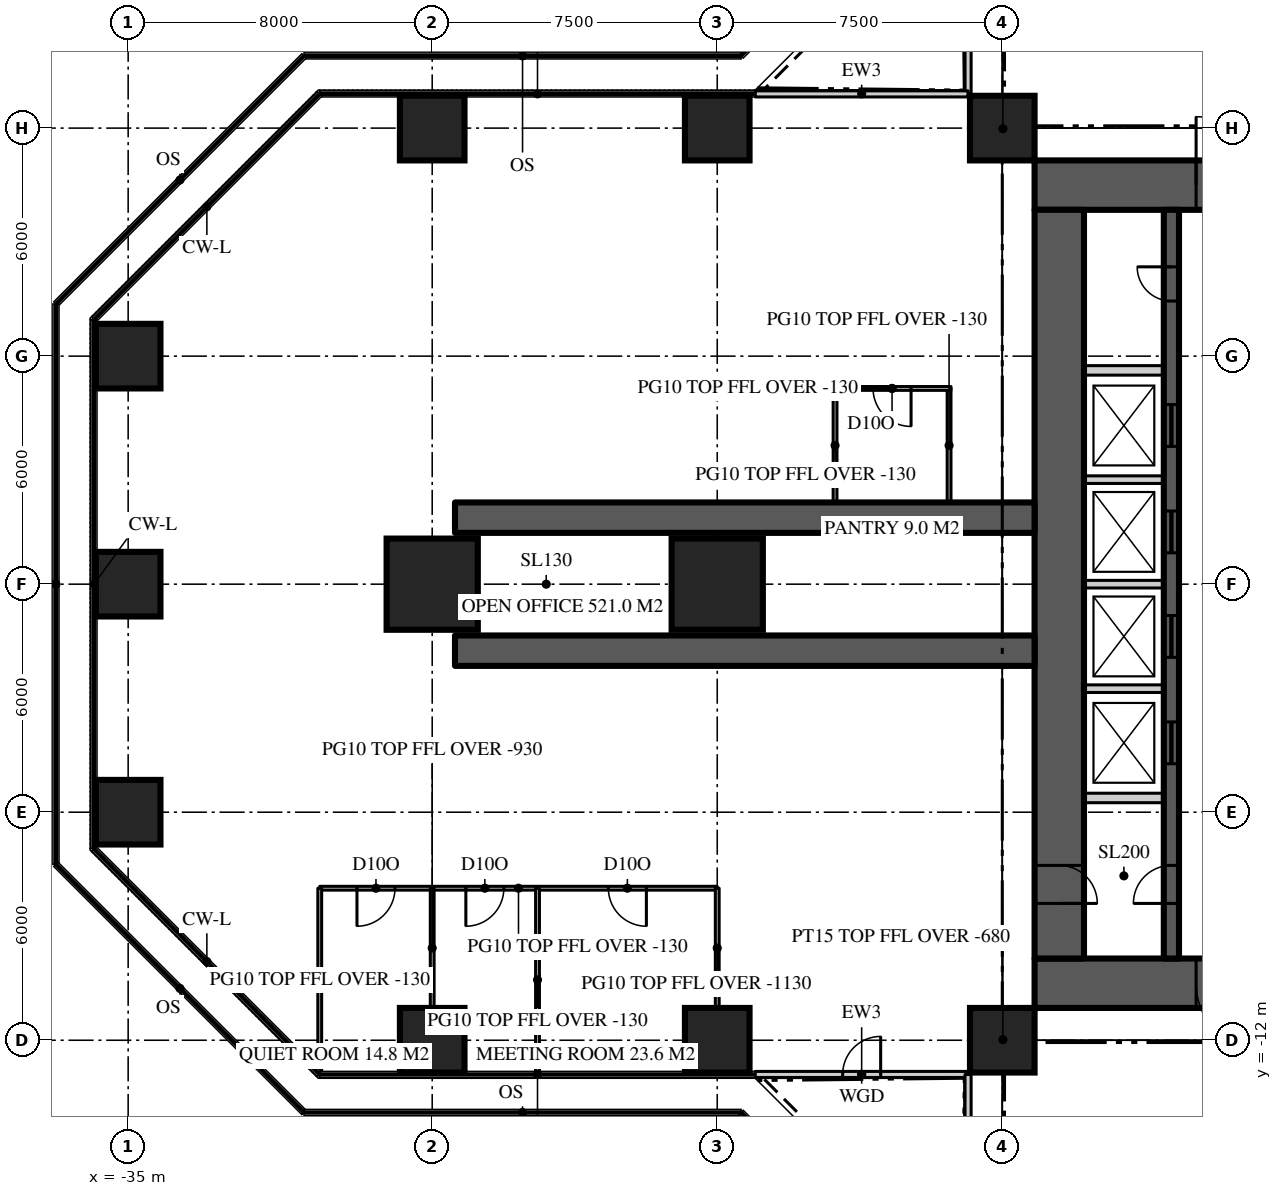
"""IFC4 building model, lengths in metres.
Left out: names, types, materials, properties, quantities, classifications, styles, units other than length and angle.
Written with IfcOpenShell. Run it as: python <this file> out.ifc"""

import sys

from ifc_helpers import new_model, si_unit, direction, frame, frame_2d, origin, origin_2d, place, context, subcontext, project, spatial, rectangle, extrude, element, fill, save


model = new_model("IFC4")
c1 = context("Model", 3, precision=1e-05, world=origin(), true_north=direction((0.0, 1.0)))
c2 = subcontext(c1, "Body", "Model", "MODEL_VIEW")
j1 = project(units=[si_unit("LENGTHUNIT", "METRE"), si_unit("PLANEANGLEUNIT", "RADIAN")], contexts=[c1])
p1 = place(None, origin())
s1 = spatial("IfcSite", under=j1, at=p1, CompositionType="ELEMENT")
p2 = place(p1, origin())
s2 = spatial("IfcBuilding", under=s1, at=p2, CompositionType="ELEMENT")
p3 = place(p2, frame((0.0, 0.0, 70.8)))
s3 = spatial("IfcBuildingStorey", under=s2, at=p3, CompositionType="ELEMENT", Elevation=70.8)
p4 = place(p3, frame((-11.15, 10.5, 0.0), z_axis=(0.0, 0.0, 1.0), x_axis=(1.0, 0.0, 0.0)))
e1 = element("IfcWall", 1, at=p4, inside=s3, PredefinedType="SHEAR", context=c2, shape_type="SweptSolid", body=[
    extrude(rectangle(XDim=22.3, YDim=1.3, at=frame_2d((11.15, 0.0))), origin(), (0.0, 0.0, 1.0), 3.9),
])
p5 = place(p4, frame((4.25, 0.0, 0.0)))
e2 = element("IfcOpeningElement", 2, at=p5, cuts=e1, PredefinedType="OPENING", context=c2, shape_type="SweptSolid", body=[
    extrude(rectangle(XDim=1.8, YDim=2.2, at=frame_2d((0.9, 1.1))), frame((0.0, 0.66, 0.0), z_axis=(0.0, -1.0, 0.0), x_axis=(1.0, 0.0, 0.0)), (0.0, 0.0, 1.0), 1.32),
])
p6 = place(p4, frame((16.25, 0.0, 0.0)))
e3 = element("IfcOpeningElement", 3, at=p6, cuts=e1, PredefinedType="OPENING", context=c2, shape_type="SweptSolid", body=[
    extrude(rectangle(XDim=1.8, YDim=2.2, at=frame_2d((0.9, 1.1))), frame((0.0, 0.66, 0.0), z_axis=(0.0, -1.0, 0.0), x_axis=(1.0, 0.0, 0.0)), (0.0, 0.0, 1.0), 1.32),
])
p7 = place(p3, frame((11.15, -10.5, 0.0), z_axis=(0.0, 0.0, 1.0), x_axis=(-1.0, 0.0, 0.0)))
e4 = element("IfcWall", 4, at=p7, inside=s3, PredefinedType="SHEAR", context=c2, shape_type="SweptSolid", body=[
    extrude(rectangle(XDim=22.3, YDim=1.3, at=frame_2d((11.15, 0.0))), origin(), (0.0, 0.0, 1.0), 3.9),
])
p8 = place(p7, frame((16.25, 0.0, 0.0)))
e5 = element("IfcOpeningElement", 5, at=p8, cuts=e4, PredefinedType="OPENING", context=c2, shape_type="SweptSolid", body=[
    extrude(rectangle(XDim=1.8, YDim=2.2, at=frame_2d((0.9, 1.1))), frame((0.0, 0.66, 0.0), z_axis=(0.0, -1.0, 0.0), x_axis=(1.0, 0.0, 0.0)), (0.0, 0.0, 1.0), 1.32),
])
p9 = place(p7, frame((4.25, 0.0, 0.0)))
e6 = element("IfcOpeningElement", 6, at=p9, cuts=e4, PredefinedType="OPENING", context=c2, shape_type="SweptSolid", body=[
    extrude(rectangle(XDim=1.8, YDim=2.2, at=frame_2d((0.9, 1.1))), frame((0.0, 0.66, 0.0), z_axis=(0.0, -1.0, 0.0), x_axis=(1.0, 0.0, 0.0)), (0.0, 0.0, 1.0), 1.32),
])
p10 = place(p3, frame((-10.5, 9.85, 0.0), z_axis=(0.0, 0.0, 1.0), x_axis=(0.0, -1.0, 0.0)))
e7 = element("IfcWall", 7, at=p10, inside=s3, PredefinedType="SHEAR", context=c2, shape_type="SweptSolid", body=[
    extrude(rectangle(XDim=19.7, YDim=1.3, at=frame_2d((9.85, 0.0))), origin(), (0.0, 0.0, 1.0), 3.9),
])
p11 = place(p10, frame((17.25, 0.0, 0.0)))
e8 = element("IfcOpeningElement", 8, at=p11, cuts=e7, PredefinedType="OPENING", context=c2, shape_type="SweptSolid", body=[
    extrude(rectangle(XDim=1.0, YDim=2.2, at=frame_2d((0.5, 1.1))), frame((0.0, 0.66, 0.0), z_axis=(0.0, -1.0, 0.0), x_axis=(1.0, 0.0, 0.0)), (0.0, 0.0, 1.0), 1.32),
])
for number, where, z_axis, x_axis in (
    (9, (-11.15, 1.75, 0.0), (0.0, 0.0, 1.0), (-1.0, 0.0, 0.0)),
    (10, (-11.15, -1.75, 0.0), (0.0, 0.0, 1.0), (-1.0, 0.0, 0.0)),
):
    element("IfcWall", number, at=place(p3, frame(where, z_axis=z_axis, x_axis=x_axis)), inside=s3, PredefinedType="SHEAR", context=c2, shape_type="SweptSolid", body=[
        extrude(rectangle(XDim=15.25, YDim=0.8, at=frame_2d((7.625, 0.0))), origin(), (0.0, 0.0, 1.0), 3.9),
    ])
for number, where, z_axis, x_axis in (
    (11, (-27.0, -12.0, 0.0), (0.0, 0.0, 1.0), (1.0, 0.0, 0.0)),
    (12, (-19.5, -12.0, 0.0), (0.0, 0.0, 1.0), (1.0, 0.0, 0.0)),
    (13, (-12.0, -12.0, 0.0), (0.0, 0.0, 1.0), (1.0, 0.0, 0.0)),
    (14, (-35.0, -6.0, 0.0), (0.0, 0.0, 1.0), (1.0, 0.0, 0.0)),
    (15, (-35.0, 0.0, 0.0), (0.0, 0.0, 1.0), (1.0, 0.0, 0.0)),
):
    element("IfcColumn", number, at=place(p3, frame(where, z_axis=z_axis, x_axis=x_axis)), inside=s3, PredefinedType="COLUMN", context=c2, shape_type="SweptSolid", body=[
        extrude(rectangle(XDim=1.7, YDim=1.7, at=origin_2d()), origin(), (0.0, 0.0, 1.0), 3.9),
    ])
for number, where, z_axis, x_axis in (
    (16, (-27.0, 0.0, 0.0), (0.0, 0.0, 1.0), (1.0, 0.0, 0.0)),
    (17, (-19.5, 0.0, 0.0), (0.0, 0.0, 1.0), (1.0, 0.0, 0.0)),
):
    element("IfcColumn", number, at=place(p3, frame(where, z_axis=z_axis, x_axis=x_axis)), inside=s3, PredefinedType="COLUMN", context=c2, shape_type="SweptSolid", body=[
        extrude(rectangle(XDim=2.4, YDim=2.4, at=origin_2d()), origin(), (0.0, 0.0, 1.0), 3.9),
    ])
for number, where, z_axis, x_axis in (
    (18, (-35.0, 6.0, 0.0), (0.0, 0.0, 1.0), (1.0, 0.0, 0.0)),
    (19, (-27.0, 12.0, 0.0), (0.0, 0.0, 1.0), (1.0, 0.0, 0.0)),
    (20, (-19.5, 12.0, 0.0), (0.0, 0.0, 1.0), (1.0, 0.0, 0.0)),
    (21, (-12.0, 12.0, 0.0), (0.0, 0.0, 1.0), (1.0, 0.0, 0.0)),
):
    element("IfcColumn", number, at=place(p3, frame(where, z_axis=z_axis, x_axis=x_axis)), inside=s3, PredefinedType="COLUMN", context=c2, shape_type="SweptSolid", body=[
        extrude(rectangle(XDim=1.7, YDim=1.7, at=origin_2d()), origin(), (0.0, 0.0, 1.0), 3.9),
    ])
p12 = place(p3, frame((-12.9, 18.5, 0.0), z_axis=(0.0, 0.0, 1.0), x_axis=(0.0, -1.0, 0.0)))
e22 = element("IfcWall", 22, at=p12, inside=s3, PredefinedType="SOLIDWALL", context=c2, shape_type="SweptSolid", body=[
    extrude(rectangle(XDim=5.6, YDim=0.16, at=frame_2d((2.8, 0.0))), origin(), (0.0, 0.0, 1.0), 3.77),
])
p13 = place(p12, frame((2.3, 0.0, 0.0)))
e23 = element("IfcOpeningElement", 23, at=p13, cuts=e22, PredefinedType="OPENING", context=c2, shape_type="SweptSolid", body=[
    extrude(rectangle(XDim=1.0, YDim=2.2, at=frame_2d((0.5, 1.1))), frame((0.0, 0.09, 0.0), z_axis=(0.0, -1.0, 0.0), x_axis=(1.0, 0.0, 0.0)), (0.0, 0.0, 1.0), 0.18),
])
p14 = place(p3, frame((-12.9, 12.9, 0.0), z_axis=(0.0, 0.0, 1.0), x_axis=(-1.0, 0.0, 0.0)))
e24 = element("IfcWall", 24, at=p14, inside=s3, PredefinedType="SOLIDWALL", context=c2, shape_type="SweptSolid", body=[
    extrude(rectangle(XDim=5.6, YDim=0.16, at=frame_2d((2.8, 0.0))), origin(), (0.0, 0.0, 1.0), 3.77),
])
p15 = place(p3, frame((-18.5, -12.9, 0.0), z_axis=(0.0, 0.0, 1.0), x_axis=(1.0, 0.0, 0.0)))
e25 = element("IfcWall", 25, at=p15, inside=s3, PredefinedType="SOLIDWALL", context=c2, shape_type="SweptSolid", body=[
    extrude(rectangle(XDim=5.6, YDim=0.16, at=frame_2d((2.8, 0.0))), origin(), (0.0, 0.0, 1.0), 3.77),
])
p16 = place(p15, frame((2.3, 0.0, 0.0)))
e26 = element("IfcOpeningElement", 26, at=p16, cuts=e25, PredefinedType="OPENING", context=c2, shape_type="SweptSolid", body=[
    extrude(rectangle(XDim=1.0, YDim=2.2, at=frame_2d((0.5, 1.1))), frame((0.0, 0.09, 0.0), z_axis=(0.0, -1.0, 0.0), x_axis=(1.0, 0.0, 0.0)), (0.0, 0.0, 1.0), 0.18),
])
p17 = place(p3, frame((-12.9, -12.9, 0.0), z_axis=(0.0, 0.0, 1.0), x_axis=(0.0, -1.0, 0.0)))
e27 = element("IfcWall", 27, at=p17, inside=s3, PredefinedType="SOLIDWALL", context=c2, shape_type="SweptSolid", body=[
    extrude(rectangle(XDim=5.6, YDim=0.16, at=frame_2d((2.8, 0.0))), origin(), (0.0, 0.0, 1.0), 3.77),
])
p18 = place(p3, frame((-7.55, -9.85, 0.0), z_axis=(0.0, 0.0, 1.0), x_axis=(0.0, 1.0, 0.0)))
e28 = element("IfcWall", 28, at=p18, inside=s3, PredefinedType="SHEAR", context=c2, shape_type="SweptSolid", body=[
    extrude(rectangle(XDim=19.7, YDim=0.4, at=frame_2d((9.85, 0.0))), origin(), (0.0, 0.0, 1.0), 3.9),
])
p19 = place(p18, frame((1.45, 0.0, 0.0)))
e29 = element("IfcOpeningElement", 29, at=p19, cuts=e28, PredefinedType="OPENING", context=c2, shape_type="SweptSolid", body=[
    extrude(rectangle(XDim=1.0, YDim=2.2, at=frame_2d((0.5, 1.1))), frame((0.0, 0.21, 0.0), z_axis=(0.0, -1.0, 0.0), x_axis=(1.0, 0.0, 0.0)), (0.0, 0.0, 1.0), 0.42),
])
p20 = place(p18, frame((17.3, 0.0, 0.0)))
e30 = element("IfcOpeningElement", 30, at=p20, cuts=e28, PredefinedType="OPENING", context=c2, shape_type="SweptSolid", body=[
    extrude(rectangle(XDim=0.9, YDim=2.1, at=frame_2d((0.45, 1.05))), frame((0.0, 0.21, 0.0), z_axis=(0.0, -1.0, 0.0), x_axis=(1.0, 0.0, 0.0)), (0.0, 0.0, 1.0), 0.42),
])
p21 = place(p18, frame((5.125, 0.0, 0.0)))
e31 = element("IfcOpeningElement", 31, at=p21, cuts=e28, PredefinedType="OPENING", context=c2, shape_type="SweptSolid", body=[
    extrude(rectangle(XDim=1.1, YDim=2.2, at=frame_2d((0.55, 1.1))), frame((0.0, 0.21, 0.0), z_axis=(0.0, -1.0, 0.0), x_axis=(1.0, 0.0, 0.0)), (0.0, 0.0, 1.0), 0.42),
])
p22 = place(p18, frame((7.925, 0.0, 0.0)))
e32 = element("IfcOpeningElement", 32, at=p22, cuts=e28, PredefinedType="OPENING", context=c2, shape_type="SweptSolid", body=[
    extrude(rectangle(XDim=1.1, YDim=2.2, at=frame_2d((0.55, 1.1))), frame((0.0, 0.21, 0.0), z_axis=(0.0, -1.0, 0.0), x_axis=(1.0, 0.0, 0.0)), (0.0, 0.0, 1.0), 0.42),
])
p23 = place(p18, frame((10.675, 0.0, 0.0)))
e33 = element("IfcOpeningElement", 33, at=p23, cuts=e28, PredefinedType="OPENING", context=c2, shape_type="SweptSolid", body=[
    extrude(rectangle(XDim=1.1, YDim=2.2, at=frame_2d((0.55, 1.1))), frame((0.0, 0.21, 0.0), z_axis=(0.0, -1.0, 0.0), x_axis=(1.0, 0.0, 0.0)), (0.0, 0.0, 1.0), 0.42),
])
p24 = place(p18, frame((13.475, 0.0, 0.0)))
e34 = element("IfcOpeningElement", 34, at=p24, cuts=e28, PredefinedType="OPENING", context=c2, shape_type="SweptSolid", body=[
    extrude(rectangle(XDim=1.1, YDim=2.2, at=frame_2d((0.55, 1.1))), frame((0.0, 0.21, 0.0), z_axis=(0.0, -1.0, 0.0), x_axis=(1.0, 0.0, 0.0)), (0.0, 0.0, 1.0), 0.42),
])
for number, where, z_axis, x_axis in (
    (35, (-9.85, 5.625, 0.0), (0.0, 0.0, 1.0), (1.0, 0.0, 0.0)),
    (36, (-9.85, -5.625, 0.0), (0.0, 0.0, 1.0), (1.0, 0.0, 0.0)),
):
    element("IfcWall", number, at=place(p3, frame(where, z_axis=z_axis, x_axis=x_axis)), inside=s3, PredefinedType="SOLIDWALL", context=c2, shape_type="SweptSolid", body=[
        extrude(rectangle(XDim=2.1, YDim=0.25, at=frame_2d((1.05, 0.0))), origin(), (0.0, 0.0, 1.0), 3.7),
    ])
for number, where, z_axis, x_axis in (
    (37, (-9.85, -2.75, 0.0), (0.0, 0.0, 1.0), (1.0, 0.0, 0.0)),
    (38, (-9.85, 0.0, 0.0), (0.0, 0.0, 1.0), (1.0, 0.0, 0.0)),
    (39, (-9.85, 2.75, 0.0), (0.0, 0.0, 1.0), (1.0, 0.0, 0.0)),
):
    element("IfcWall", number, at=place(p3, frame(where, z_axis=z_axis, x_axis=x_axis)), inside=s3, PredefinedType="SOLIDWALL", context=c2, shape_type="SweptSolid", body=[
        extrude(rectangle(XDim=2.1, YDim=0.2, at=frame_2d((1.05, 0.0))), origin(), (0.0, 0.0, 1.0), 3.7),
    ])
p25 = place(p3, frame((-19.5, -8.0, 0.0), z_axis=(0.0, 0.0, 1.0), x_axis=(-1.0, 0.0, 0.0)))
e40 = element("IfcWall", 40, at=p25, inside=s3, PredefinedType="PARTITIONING", context=c2, shape_type="SweptSolid", body=[
    extrude(rectangle(XDim=10.459, YDim=0.1, at=frame_2d((5.229, 0.0))), origin(), (0.0, 0.0, 1.0), 3.77),
])
p26 = place(p25, frame((1.865, 0.0, 0.0)))
e41 = element("IfcOpeningElement", 41, at=p26, cuts=e40, PredefinedType="OPENING", context=c2, shape_type="SweptSolid", body=[
    extrude(rectangle(XDim=1.0, YDim=2.2, at=frame_2d((0.5, 1.1))), frame((0.0, 0.06, 0.0), z_axis=(0.0, -1.0, 0.0), x_axis=(1.0, 0.0, 0.0)), (0.0, 0.0, 1.0), 0.12),
])
p27 = place(p25, frame((5.615, 0.0, 0.0)))
e42 = element("IfcOpeningElement", 42, at=p27, cuts=e40, PredefinedType="OPENING", context=c2, shape_type="SweptSolid", body=[
    extrude(rectangle(XDim=1.0, YDim=2.2, at=frame_2d((0.5, 1.1))), frame((0.0, 0.06, 0.0), z_axis=(0.0, -1.0, 0.0), x_axis=(1.0, 0.0, 0.0)), (0.0, 0.0, 1.0), 0.12),
])
p28 = place(p25, frame((8.479, 0.0, 0.0)))
e43 = element("IfcOpeningElement", 43, at=p28, cuts=e40, PredefinedType="OPENING", context=c2, shape_type="SweptSolid", body=[
    extrude(rectangle(XDim=1.0, YDim=2.2, at=frame_2d((0.5, 1.1))), frame((0.0, 0.06, 0.0), z_axis=(0.0, -1.0, 0.0), x_axis=(1.0, 0.0, 0.0)), (0.0, 0.0, 1.0), 0.12),
])
p29 = place(p3, frame((-19.5, -8.0, 0.0), z_axis=(0.0, 0.0, 1.0), x_axis=(0.0, -1.0, 0.0)))
e44 = element("IfcWall", 44, at=p29, inside=s3, PredefinedType="PARTITIONING", context=c2, shape_type="SweptSolid", body=[
    extrude(rectangle(XDim=3.15, YDim=0.1, at=frame_2d((1.575, 0.0))), origin(), (0.0, 0.0, 1.0), 2.77),
])
p30 = place(p3, frame((-24.229, -8.0, 0.0), z_axis=(0.0, 0.0, 1.0), x_axis=(0.0, -1.0, 0.0)))
e45 = element("IfcWall", 45, at=p30, inside=s3, PredefinedType="PARTITIONING", context=c2, shape_type="SweptSolid", body=[
    extrude(rectangle(XDim=4.82, YDim=0.1, at=frame_2d((2.41, 0.0))), origin(), (0.0, 0.0, 1.0), 3.77),
])
p31 = place(p3, frame((-27.0, -8.0, 0.0), z_axis=(0.0, 0.0, 1.0), x_axis=(0.0, -1.0, 0.0)))
e46 = element("IfcWall", 46, at=p31, inside=s3, PredefinedType="PARTITIONING", context=c2, shape_type="SweptSolid", body=[
    extrude(rectangle(XDim=3.15, YDim=0.1, at=frame_2d((1.575, 0.0))), origin(), (0.0, 0.0, 1.0), 2.97),
])
p32 = place(p3, frame((-29.959, -8.0, 0.0), z_axis=(0.0, 0.0, 1.0), x_axis=(0.0, -1.0, 0.0)))
e47 = element("IfcWall", 47, at=p32, inside=s3, PredefinedType="PARTITIONING", context=c2, shape_type="SweptSolid", body=[
    extrude(rectangle(XDim=4.82, YDim=0.1, at=frame_2d((2.41, 0.0))), origin(), (0.0, 0.0, 1.0), 3.77),
])
for number, where, z_axis, x_axis in (
    (48, (-13.4, 2.15, 0.0), (0.0, 0.0, 1.0), (0.0, 1.0, 0.0)),
    (49, (-16.4, 2.15, 0.0), (0.0, 0.0, 1.0), (0.0, 1.0, 0.0)),
):
    element("IfcWall", number, at=place(p3, frame(where, z_axis=z_axis, x_axis=x_axis)), inside=s3, PredefinedType="PARTITIONING", context=c2, shape_type="SweptSolid", body=[
        extrude(rectangle(XDim=3.0, YDim=0.1, at=frame_2d((1.5, 0.0))), origin(), (0.0, 0.0, 1.0), 3.77),
    ])
p33 = place(p3, frame((-13.35, 5.15, 0.0), z_axis=(0.0, 0.0, 1.0), x_axis=(-1.0, 0.0, 0.0)))
e50 = element("IfcWall", 50, at=p33, inside=s3, PredefinedType="PARTITIONING", context=c2, shape_type="SweptSolid", body=[
    extrude(rectangle(XDim=3.1, YDim=0.1, at=frame_2d((1.55, 0.0))), origin(), (0.0, 0.0, 1.0), 3.77),
])
p34 = place(p33, frame((1.05, 0.0, 0.0)))
e51 = element("IfcOpeningElement", 51, at=p34, cuts=e50, PredefinedType="OPENING", context=c2, shape_type="SweptSolid", body=[
    extrude(rectangle(XDim=1.0, YDim=2.2, at=frame_2d((0.5, 1.1))), frame((0.0, 0.06, 0.0), z_axis=(0.0, -1.0, 0.0), x_axis=(1.0, 0.0, 0.0)), (0.0, 0.0, 1.0), 0.12),
])
for number, where, z_axis, x_axis in (
    (52, (-11.15, 11.15, 0.0), (0.0, 0.0, 1.0), (-0.707, 0.707, 0.0)),
    (53, (-11.15, -11.15, 0.0), (0.0, 0.0, 1.0), (-0.707, -0.707, 0.0)),
):
    element("IfcWall", number, at=place(p3, frame(where, z_axis=z_axis, x_axis=x_axis)), inside=s3, PredefinedType="PARTITIONING", context=c2, shape_type="SweptSolid", body=[
        extrude(rectangle(XDim=2.362, YDim=0.15, at=frame_2d((1.181, 0.0))), origin(), (0.0, 0.0, 1.0), 3.22),
    ])
p35 = place(p16, origin())
e54 = element("IfcDoor", 54, at=p35, inside=s3, OperationType="SINGLE_SWING_RIGHT", PredefinedType="DOOR", context=c2, shape_type="SweptSolid", body=[
    extrude(rectangle(XDim=1.0, YDim=2.2, at=frame_2d((0.5, 1.1))), frame((0.0, 0.025, 0.0), z_axis=(0.0, -1.0, 0.0), x_axis=(1.0, 0.0, 0.0)), (0.0, 0.0, 1.0), 0.05),
])
fill(e26, e54)
p36 = place(p5, origin())
e55 = element("IfcDoor", 55, at=p36, inside=s3, OperationType="DOUBLE_DOOR_DOUBLE_SWING", PredefinedType="DOOR", context=c2, shape_type="SweptSolid", body=[
    extrude(rectangle(XDim=1.8, YDim=2.2, at=frame_2d((0.9, 1.1))), frame((0.0, 0.025, 0.0), z_axis=(0.0, -1.0, 0.0), x_axis=(1.0, 0.0, 0.0)), (0.0, 0.0, 1.0), 0.05),
])
fill(e2, e55)
p37 = place(p8, origin())
e56 = element("IfcDoor", 56, at=p37, inside=s3, OperationType="DOUBLE_DOOR_DOUBLE_SWING", PredefinedType="DOOR", context=c2, shape_type="SweptSolid", body=[
    extrude(rectangle(XDim=1.8, YDim=2.2, at=frame_2d((0.9, 1.1))), frame((0.0, 0.025, 0.0), z_axis=(0.0, -1.0, 0.0), x_axis=(1.0, 0.0, 0.0)), (0.0, 0.0, 1.0), 0.05),
])
fill(e5, e56)
p38 = place(p19, origin())
e57 = element("IfcDoor", 57, at=p38, inside=s3, OperationType="SINGLE_SWING_LEFT", PredefinedType="DOOR", context=c2, shape_type="SweptSolid", body=[
    extrude(rectangle(XDim=1.0, YDim=2.2, at=frame_2d((0.5, 1.1))), frame((0.0, 0.025, 0.0), z_axis=(0.0, -1.0, 0.0), x_axis=(1.0, 0.0, 0.0)), (0.0, 0.0, 1.0), 0.05),
])
fill(e29, e57)
p39 = place(p11, origin())
e58 = element("IfcDoor", 58, at=p39, inside=s3, OperationType="SINGLE_SWING_RIGHT", PredefinedType="DOOR", context=c2, shape_type="SweptSolid", body=[
    extrude(rectangle(XDim=1.0, YDim=2.2, at=frame_2d((0.5, 1.1))), frame((0.0, 0.025, 0.0), z_axis=(0.0, -1.0, 0.0), x_axis=(1.0, 0.0, 0.0)), (0.0, 0.0, 1.0), 0.05),
])
fill(e8, e58)
p40 = place(p20, origin())
e59 = element("IfcDoor", 59, at=p40, inside=s3, OperationType="SINGLE_SWING_RIGHT", PredefinedType="DOOR", context=c2, shape_type="SweptSolid", body=[
    extrude(rectangle(XDim=0.9, YDim=2.1, at=frame_2d((0.45, 1.05))), frame((0.0, 0.025, 0.0), z_axis=(0.0, -1.0, 0.0), x_axis=(1.0, 0.0, 0.0)), (0.0, 0.0, 1.0), 0.05),
])
fill(e30, e59)
p41 = place(p21, origin())
e60 = element("IfcDoor", 60, at=p41, inside=s3, OperationType="SLIDING_TO_LEFT", PredefinedType="DOOR", context=c2, shape_type="SweptSolid", body=[
    extrude(rectangle(XDim=1.1, YDim=2.2, at=frame_2d((0.55, 1.1))), frame((0.0, 0.025, 0.0), z_axis=(0.0, -1.0, 0.0), x_axis=(1.0, 0.0, 0.0)), (0.0, 0.0, 1.0), 0.05),
])
fill(e31, e60)
p42 = place(p22, origin())
e61 = element("IfcDoor", 61, at=p42, inside=s3, OperationType="SLIDING_TO_LEFT", PredefinedType="DOOR", context=c2, shape_type="SweptSolid", body=[
    extrude(rectangle(XDim=1.1, YDim=2.2, at=frame_2d((0.55, 1.1))), frame((0.0, 0.025, 0.0), z_axis=(0.0, -1.0, 0.0), x_axis=(1.0, 0.0, 0.0)), (0.0, 0.0, 1.0), 0.05),
])
fill(e32, e61)
p43 = place(p23, origin())
e62 = element("IfcDoor", 62, at=p43, inside=s3, OperationType="SLIDING_TO_LEFT", PredefinedType="DOOR", context=c2, shape_type="SweptSolid", body=[
    extrude(rectangle(XDim=1.1, YDim=2.2, at=frame_2d((0.55, 1.1))), frame((0.0, 0.025, 0.0), z_axis=(0.0, -1.0, 0.0), x_axis=(1.0, 0.0, 0.0)), (0.0, 0.0, 1.0), 0.05),
])
fill(e33, e62)
p44 = place(p24, origin())
e63 = element("IfcDoor", 63, at=p44, inside=s3, OperationType="SLIDING_TO_LEFT", PredefinedType="DOOR", context=c2, shape_type="SweptSolid", body=[
    extrude(rectangle(XDim=1.1, YDim=2.2, at=frame_2d((0.55, 1.1))), frame((0.0, 0.025, 0.0), z_axis=(0.0, -1.0, 0.0), x_axis=(1.0, 0.0, 0.0)), (0.0, 0.0, 1.0), 0.05),
])
fill(e34, e63)
p45 = place(p26, origin())
e64 = element("IfcDoor", 64, at=p45, inside=s3, OperationType="SINGLE_SWING_LEFT", PredefinedType="DOOR", context=c2, shape_type="SweptSolid", body=[
    extrude(rectangle(XDim=1.0, YDim=2.2, at=frame_2d((0.5, 1.1))), frame((0.0, 0.025, 0.0), z_axis=(0.0, -1.0, 0.0), x_axis=(1.0, 0.0, 0.0)), (0.0, 0.0, 1.0), 0.05),
])
fill(e41, e64)
p46 = place(p27, origin())
e65 = element("IfcDoor", 65, at=p46, inside=s3, OperationType="SINGLE_SWING_RIGHT", PredefinedType="DOOR", context=c2, shape_type="SweptSolid", body=[
    extrude(rectangle(XDim=1.0, YDim=2.2, at=frame_2d((0.5, 1.1))), frame((0.0, 0.025, 0.0), z_axis=(0.0, -1.0, 0.0), x_axis=(1.0, 0.0, 0.0)), (0.0, 0.0, 1.0), 0.05),
])
fill(e42, e65)
p47 = place(p28, origin())
e66 = element("IfcDoor", 66, at=p47, inside=s3, OperationType="SINGLE_SWING_RIGHT", PredefinedType="DOOR", context=c2, shape_type="SweptSolid", body=[
    extrude(rectangle(XDim=1.0, YDim=2.2, at=frame_2d((0.5, 1.1))), frame((0.0, 0.025, 0.0), z_axis=(0.0, -1.0, 0.0), x_axis=(1.0, 0.0, 0.0)), (0.0, 0.0, 1.0), 0.05),
])
fill(e43, e66)
p48 = place(p34, origin())
e67 = element("IfcDoor", 67, at=p48, inside=s3, OperationType="SINGLE_SWING_LEFT", PredefinedType="DOOR", context=c2, shape_type="SweptSolid", body=[
    extrude(rectangle(XDim=1.0, YDim=2.2, at=frame_2d((0.5, 1.1))), frame((0.0, 0.025, 0.0), z_axis=(0.0, -1.0, 0.0), x_axis=(1.0, 0.0, 0.0)), (0.0, 0.0, 1.0), 0.05),
])
fill(e51, e67)
save(model, sys.argv[1])
